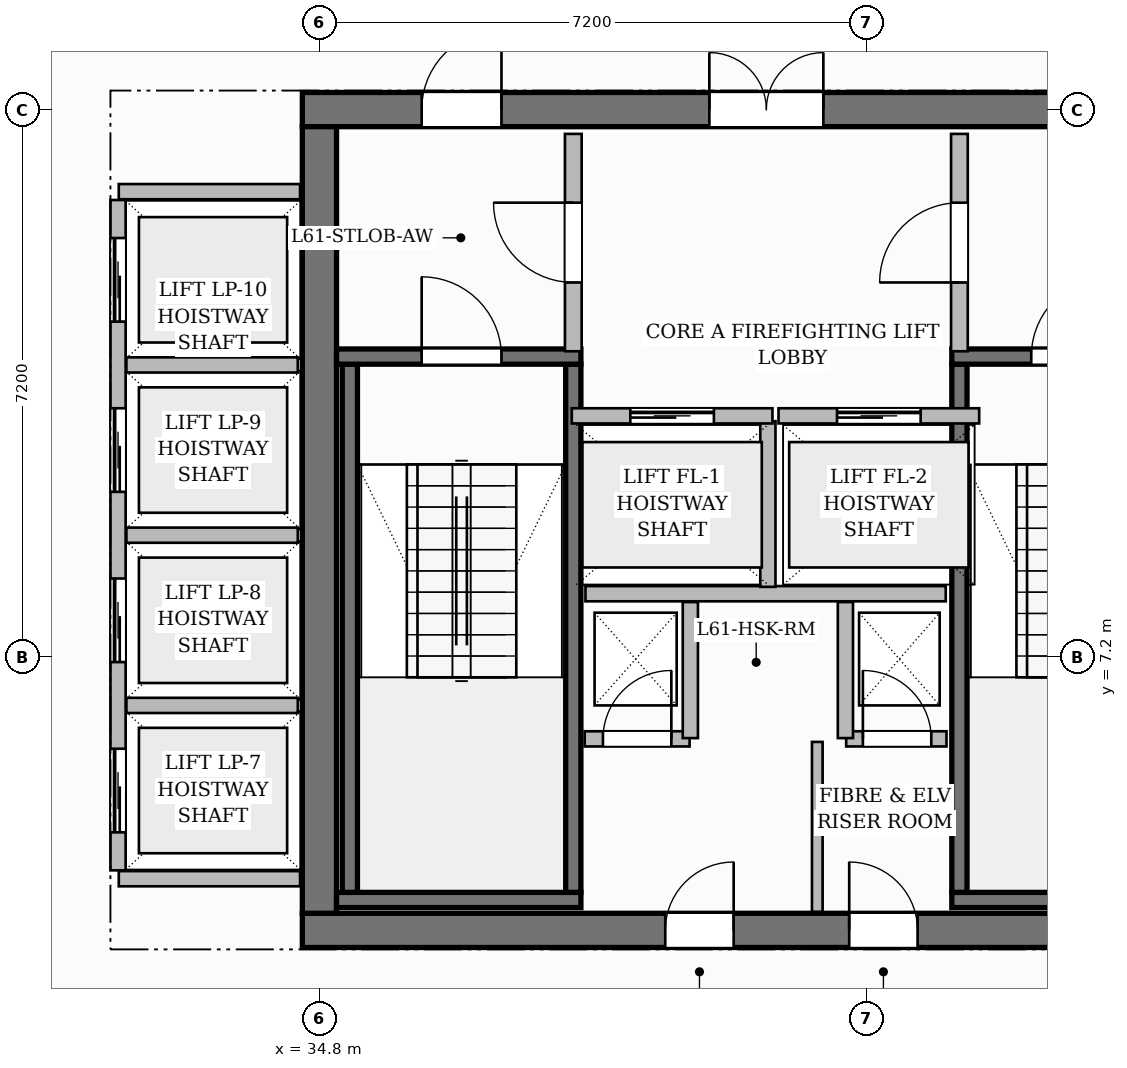
"""IFC4 building model, lengths in metres.
Left out: names, types, materials, properties, quantities, classifications, styles, units other than length and angle.
Written with IfcOpenShell. Run it as: python <this file> out.ifc"""

import sys

from ifc_helpers import new_model, si_unit, direction, frame, frame_2d, origin, place, context, subcontext, project, spatial, rectangle, extrude, source, transform, mapped, element, fill, save


model = new_model("IFC4")
c1 = context("Model", 3, precision=1e-05, world=origin(), true_north=direction((0.0, 1.0)))
c2 = subcontext(c1, "Body", "Model", "MODEL_VIEW")
j1 = project(units=[si_unit("LENGTHUNIT", "METRE"), si_unit("PLANEANGLEUNIT", "RADIAN")], contexts=[c1])
p1 = place(None, origin())
s1 = spatial("IfcSite", under=j1, at=p1, CompositionType="ELEMENT")
p2 = place(p1, origin())
s2 = spatial("IfcBuilding", under=s1, at=p2, CompositionType="ELEMENT")
p3 = place(p2, frame((0.0, 0.0, 244.25)))
s3 = spatial("IfcBuildingStorey", under=s2, at=p3, CompositionType="ELEMENT", Elevation=244.25)
p4 = place(p3, frame((34.575, 3.6, 0.0), z_axis=(0.0, 0.0, 1.0), x_axis=(1.0, 0.0, 0.0)))
e1 = element("IfcWall", 1, at=p4, inside=s3, PredefinedType="SHEAR", context=c2, shape_type="SweptSolid", body=[
    extrude(rectangle(XDim=15.45, YDim=0.45, at=frame_2d((7.725, 0.0))), origin(), (0.0, 0.0, 1.0), 3.85),
])
p5 = place(p4, frame((4.775, 0.0, 0.0)))
e2 = element("IfcOpeningElement", 2, at=p5, cuts=e1, PredefinedType="OPENING", context=c2, shape_type="SweptSolid", body=[
    extrude(rectangle(XDim=0.9, YDim=2.1, at=frame_2d((0.45, 1.05))), frame((0.0, 0.235, 0.0), z_axis=(0.0, -1.0, 0.0), x_axis=(1.0, 0.0, 0.0)), (0.0, 0.0, 1.0), 0.47),
])
p6 = place(p4, frame((7.195, 0.0, 0.0)))
e3 = element("IfcOpeningElement", 3, at=p6, cuts=e1, PredefinedType="OPENING", context=c2, shape_type="SweptSolid", body=[
    extrude(rectangle(XDim=0.9, YDim=2.1, at=frame_2d((0.45, 1.05))), frame((0.0, 0.235, 0.0), z_axis=(0.0, -1.0, 0.0), x_axis=(1.0, 0.0, 0.0)), (0.0, 0.0, 1.0), 0.47),
])
p7 = place(p3, frame((34.575, 14.4, 0.0), z_axis=(0.0, 0.0, 1.0), x_axis=(1.0, 0.0, 0.0)))
e4 = element("IfcWall", 4, at=p7, inside=s3, PredefinedType="SHEAR", context=c2, shape_type="SweptSolid", body=[
    extrude(rectangle(XDim=15.45, YDim=0.45, at=frame_2d((7.725, 0.0))), origin(), (0.0, 0.0, 1.0), 3.85),
])
p8 = place(p7, frame((5.355, 0.0, 0.0)))
e5 = element("IfcOpeningElement", 5, at=p8, cuts=e4, PredefinedType="OPENING", context=c2, shape_type="SweptSolid", body=[
    extrude(rectangle(XDim=1.5, YDim=2.2, at=frame_2d((0.75, 1.1))), frame((0.0, 0.235, 0.0), z_axis=(0.0, -1.0, 0.0), x_axis=(1.0, 0.0, 0.0)), (0.0, 0.0, 1.0), 0.47),
])
p9 = place(p7, frame((1.57, 0.0, 0.0)))
e6 = element("IfcOpeningElement", 6, at=p9, cuts=e4, PredefinedType="OPENING", context=c2, shape_type="SweptSolid", body=[
    extrude(rectangle(XDim=1.05, YDim=2.15, at=frame_2d((0.525, 1.075))), frame((0.0, 0.235, 0.0), z_axis=(0.0, -1.0, 0.0), x_axis=(1.0, 0.0, 0.0)), (0.0, 0.0, 1.0), 0.47),
])
p10 = place(p7, frame((11.2, 0.0, 0.0)))
e7 = element("IfcOpeningElement", 7, at=p10, cuts=e4, PredefinedType="OPENING", context=c2, shape_type="SweptSolid", body=[
    extrude(rectangle(XDim=1.05, YDim=2.15, at=frame_2d((0.525, 1.075))), frame((0.0, 0.235, 0.0), z_axis=(0.0, -1.0, 0.0), x_axis=(1.0, 0.0, 0.0)), (0.0, 0.0, 1.0), 0.47),
])
p11 = place(p3, frame((34.8, 3.825, 0.0), z_axis=(0.0, 0.0, 1.0), x_axis=(0.0, 1.0, 0.0)))
e8 = element("IfcWall", 8, at=p11, inside=s3, PredefinedType="SHEAR", context=c2, shape_type="SweptSolid", body=[
    extrude(rectangle(XDim=10.35, YDim=0.45, at=frame_2d((5.175, 0.0))), origin(), (0.0, 0.0, 1.0), 3.85),
])
p12 = place(p3, frame((35.025, 4.0, 0.0), z_axis=(0.0, 0.0, 1.0), x_axis=(1.0, 0.0, 0.0)))
e9 = element("IfcWall", 9, at=p12, inside=s3, PredefinedType="SHEAR", context=c2, shape_type="SweptSolid", body=[
    extrude(rectangle(XDim=3.215, YDim=0.2, at=frame_2d((1.607, 0.0))), origin(), (0.0, 0.0, 1.0), 3.85),
])
for number, where, z_axis, x_axis in (
    (10, (35.2, 4.1, 0.0), (0.0, 0.0, 1.0), (0.0, 1.0, 0.0)),
    (11, (38.14, 4.1, 0.0), (0.0, 0.0, 1.0), (0.0, 1.0, 0.0)),
):
    element("IfcWall", number, at=place(p3, frame(where, z_axis=z_axis, x_axis=x_axis)), inside=s3, PredefinedType="SHEAR", context=c2, shape_type="SweptSolid", body=[
        extrude(rectangle(XDim=6.95, YDim=0.2, at=frame_2d((3.475, 0.0))), origin(), (0.0, 0.0, 1.0), 3.85),
    ])
p13 = place(p3, frame((35.025, 11.15, 0.0), z_axis=(0.0, 0.0, 1.0), x_axis=(1.0, 0.0, 0.0)))
e12 = element("IfcWall", 12, at=p13, inside=s3, PredefinedType="SHEAR", context=c2, shape_type="SweptSolid", body=[
    extrude(rectangle(XDim=3.215, YDim=0.2, at=frame_2d((1.607, 0.0))), origin(), (0.0, 0.0, 1.0), 3.85),
])
p14 = place(p13, frame((1.12, 0.0, 0.0)))
e13 = element("IfcOpeningElement", 13, at=p14, cuts=e12, PredefinedType="OPENING", context=c2, shape_type="SweptSolid", body=[
    extrude(rectangle(XDim=1.05, YDim=2.2, at=frame_2d((0.525, 1.1))), frame((0.0, 0.11, 0.0), z_axis=(0.0, -1.0, 0.0), x_axis=(1.0, 0.0, 0.0)), (0.0, 0.0, 1.0), 0.22),
])
p15 = place(p3, frame((43.12, 4.0, 0.0), z_axis=(0.0, 0.0, 1.0), x_axis=(1.0, 0.0, 0.0)))
e14 = element("IfcWall", 14, at=p15, inside=s3, PredefinedType="SHEAR", context=c2, shape_type="SweptSolid", body=[
    extrude(rectangle(XDim=6.455, YDim=0.2, at=frame_2d((3.228, 0.0))), origin(), (0.0, 0.0, 1.0), 3.85),
])
p16 = place(p3, frame((43.22, 4.1, 0.0), z_axis=(0.0, 0.0, 1.0), x_axis=(0.0, 1.0, 0.0)))
e15 = element("IfcWall", 15, at=p16, inside=s3, PredefinedType="SHEAR", context=c2, shape_type="SweptSolid", body=[
    extrude(rectangle(XDim=6.95, YDim=0.2, at=frame_2d((3.475, 0.0))), origin(), (0.0, 0.0, 1.0), 3.85),
])
p17 = place(p3, frame((43.12, 11.15, 0.0), z_axis=(0.0, 0.0, 1.0), x_axis=(1.0, 0.0, 0.0)))
e16 = element("IfcWall", 16, at=p17, inside=s3, PredefinedType="SHEAR", context=c2, shape_type="SweptSolid", body=[
    extrude(rectangle(XDim=6.455, YDim=0.2, at=frame_2d((3.228, 0.0))), origin(), (0.0, 0.0, 1.0), 3.85),
])
p18 = place(p17, frame((1.045, 0.0, 0.0)))
e17 = element("IfcOpeningElement", 17, at=p18, cuts=e16, PredefinedType="OPENING", context=c2, shape_type="SweptSolid", body=[
    extrude(rectangle(XDim=1.05, YDim=2.2, at=frame_2d((0.525, 1.1))), frame((0.0, 0.11, 0.0), z_axis=(0.0, -1.0, 0.0), x_axis=(1.0, 0.0, 0.0)), (0.0, 0.0, 1.0), 0.22),
])
p19 = place(p17, frame((4.125, 0.0, 0.0)))
e18 = element("IfcOpeningElement", 18, at=p19, cuts=e16, PredefinedType="OPENING", context=c2, shape_type="SweptSolid", body=[
    extrude(rectangle(XDim=1.05, YDim=2.2, at=frame_2d((0.525, 1.1))), frame((0.0, 0.11, 0.0), z_axis=(0.0, -1.0, 0.0), x_axis=(1.0, 0.0, 0.0)), (0.0, 0.0, 1.0), 0.22),
])
p20 = place(p3, frame((38.3, 8.03, 0.0), z_axis=(0.0, 0.0, 1.0), x_axis=(1.0, 0.0, 0.0)))
e19 = element("IfcWall", 19, at=p20, inside=s3, PredefinedType="PARTITIONING", context=c2, shape_type="SweptSolid", body=[
    extrude(rectangle(XDim=4.74, YDim=0.2, at=frame_2d((2.37, 0.0))), origin(), (0.0, 0.0, 1.0), 3.6),
])
p21 = place(p3, frame((40.7, 8.12, 0.0), z_axis=(0.0, 0.0, 1.0), x_axis=(0.0, 1.0, 0.0)))
e20 = element("IfcWall", 20, at=p21, inside=s3, PredefinedType="PARTITIONING", context=c2, shape_type="SweptSolid", body=[
    extrude(rectangle(XDim=2.18, YDim=0.2, at=frame_2d((1.09, 0.0))), origin(), (0.0, 0.0, 1.0), 3.6),
])
p22 = place(p3, frame((38.14, 11.22, 0.0), z_axis=(0.0, 0.0, 1.0), x_axis=(0.0, 1.0, 0.0)))
e21 = element("IfcWall", 21, at=p22, inside=s3, PredefinedType="PARTITIONING", context=c2, shape_type="SweptSolid", body=[
    extrude(rectangle(XDim=2.86, YDim=0.22, at=frame_2d((1.43, 0.0))), origin(), (0.0, 0.0, 1.0), 3.6),
])
p23 = place(p22, frame((0.905, 0.0, 0.0)))
e22 = element("IfcOpeningElement", 22, at=p23, cuts=e21, PredefinedType="OPENING", context=c2, shape_type="SweptSolid", body=[
    extrude(rectangle(XDim=1.05, YDim=2.15, at=frame_2d((0.525, 1.075))), frame((0.0, 0.12, 0.0), z_axis=(0.0, -1.0, 0.0), x_axis=(1.0, 0.0, 0.0)), (0.0, 0.0, 1.0), 0.24),
])
p24 = place(p3, frame((43.22, 11.22, 0.0), z_axis=(0.0, 0.0, 1.0), x_axis=(0.0, 1.0, 0.0)))
e23 = element("IfcWall", 23, at=p24, inside=s3, PredefinedType="PARTITIONING", context=c2, shape_type="SweptSolid", body=[
    extrude(rectangle(XDim=2.86, YDim=0.22, at=frame_2d((1.43, 0.0))), origin(), (0.0, 0.0, 1.0), 3.6),
])
p25 = place(p24, frame((0.905, 0.0, 0.0)))
e24 = element("IfcOpeningElement", 24, at=p25, cuts=e23, PredefinedType="OPENING", context=c2, shape_type="SweptSolid", body=[
    extrude(rectangle(XDim=1.05, YDim=2.15, at=frame_2d((0.525, 1.075))), frame((0.0, 0.12, 0.0), z_axis=(0.0, -1.0, 0.0), x_axis=(1.0, 0.0, 0.0)), (0.0, 0.0, 1.0), 0.24),
])
p26 = place(p3, frame((38.29, 6.12, 0.0), z_axis=(0.0, 0.0, 1.0), x_axis=(1.0, 0.0, 0.0)))
e25 = element("IfcWall", 25, at=p26, inside=s3, PredefinedType="PARTITIONING", context=c2, shape_type="SweptSolid", body=[
    extrude(rectangle(XDim=1.38, YDim=0.2, at=frame_2d((0.69, 0.0))), origin(), (0.0, 0.0, 1.0), 3.6),
])
p27 = place(p26, frame((0.24, 0.0, 0.0)))
e26 = element("IfcOpeningElement", 26, at=p27, cuts=e25, PredefinedType="OPENING", context=c2, shape_type="SweptSolid", body=[
    extrude(rectangle(XDim=0.9, YDim=2.1, at=frame_2d((0.45, 1.05))), frame((0.0, 0.11, 0.0), z_axis=(0.0, -1.0, 0.0), x_axis=(1.0, 0.0, 0.0)), (0.0, 0.0, 1.0), 0.22),
])
p28 = place(p3, frame((39.68, 6.13, 0.0), z_axis=(0.0, 0.0, 1.0), x_axis=(0.0, 1.0, 0.0)))
e27 = element("IfcWall", 27, at=p28, inside=s3, PredefinedType="PARTITIONING", context=c2, shape_type="SweptSolid", body=[
    extrude(rectangle(XDim=1.79, YDim=0.2, at=frame_2d((0.895, 0.0))), origin(), (0.0, 0.0, 1.0), 3.6),
])
p29 = place(p3, frame((41.73, 6.12, 0.0), z_axis=(0.0, 0.0, 1.0), x_axis=(1.0, 0.0, 0.0)))
e28 = element("IfcWall", 28, at=p29, inside=s3, PredefinedType="PARTITIONING", context=c2, shape_type="SweptSolid", body=[
    extrude(rectangle(XDim=1.32, YDim=0.2, at=frame_2d((0.66, 0.0))), origin(), (0.0, 0.0, 1.0), 3.6),
])
p30 = place(p29, frame((0.22, 0.0, 0.0)))
e29 = element("IfcOpeningElement", 29, at=p30, cuts=e28, PredefinedType="OPENING", context=c2, shape_type="SweptSolid", body=[
    extrude(rectangle(XDim=0.9, YDim=2.1, at=frame_2d((0.45, 1.05))), frame((0.0, 0.11, 0.0), z_axis=(0.0, -1.0, 0.0), x_axis=(1.0, 0.0, 0.0)), (0.0, 0.0, 1.0), 0.22),
])
p31 = place(p3, frame((41.72, 6.13, 0.0), z_axis=(0.0, 0.0, 1.0), x_axis=(0.0, 1.0, 0.0)))
e30 = element("IfcWall", 30, at=p31, inside=s3, PredefinedType="PARTITIONING", context=c2, shape_type="SweptSolid", body=[
    extrude(rectangle(XDim=1.79, YDim=0.2, at=frame_2d((0.895, 0.0))), origin(), (0.0, 0.0, 1.0), 3.6),
])
p32 = place(p3, frame((41.35, 3.845, 0.0), z_axis=(0.0, 0.0, 1.0), x_axis=(0.0, 1.0, 0.0)))
e31 = element("IfcWall", 31, at=p32, inside=s3, PredefinedType="PARTITIONING", context=c2, shape_type="SweptSolid", body=[
    extrude(rectangle(XDim=2.235, YDim=0.14, at=frame_2d((1.118, 0.0))), origin(), (0.0, 0.0, 1.0), 3.6),
])
for number, where, z_axis, x_axis in (
    (32, (32.16, 4.28, 0.0), (0.0, 0.0, 1.0), (1.0, 0.0, 0.0)),
    (33, (32.16, 13.32, 0.0), (0.0, 0.0, 1.0), (1.0, 0.0, 0.0)),
):
    element("IfcWall", number, at=place(p3, frame(where, z_axis=z_axis, x_axis=x_axis)), inside=s3, PredefinedType="PARTITIONING", context=c2, shape_type="SweptSolid", body=[
        extrude(rectangle(XDim=2.385, YDim=0.2, at=frame_2d((1.192, 0.0))), origin(), (0.0, 0.0, 1.0), 3.6),
    ])
p33 = place(p3, frame((32.15, 4.39, 0.0), z_axis=(0.0, 0.0, 1.0), x_axis=(0.0, 1.0, 0.0)))
e34 = element("IfcWall", 34, at=p33, inside=s3, PredefinedType="PARTITIONING", context=c2, shape_type="SweptSolid", body=[
    extrude(rectangle(XDim=8.82, YDim=0.2, at=frame_2d((4.41, 0.0))), origin(), (0.0, 0.0, 1.0), 3.6),
])
p34 = place(p33, frame((0.5, 0.0, 0.0)))
e35 = element("IfcOpeningElement", 35, at=p34, cuts=e34, PredefinedType="OPENING", context=c2, shape_type="SweptSolid", body=[
    extrude(rectangle(XDim=1.1, YDim=2.2, at=frame_2d((0.55, 1.1))), frame((0.0, 0.11, 0.0), z_axis=(0.0, -1.0, 0.0), x_axis=(1.0, 0.0, 0.0)), (0.0, 0.0, 1.0), 0.22),
])
p35 = place(p33, frame((2.74, 0.0, 0.0)))
e36 = element("IfcOpeningElement", 36, at=p35, cuts=e34, PredefinedType="OPENING", context=c2, shape_type="SweptSolid", body=[
    extrude(rectangle(XDim=1.1, YDim=2.2, at=frame_2d((0.55, 1.1))), frame((0.0, 0.11, 0.0), z_axis=(0.0, -1.0, 0.0), x_axis=(1.0, 0.0, 0.0)), (0.0, 0.0, 1.0), 0.22),
])
p36 = place(p33, frame((4.98, 0.0, 0.0)))
e37 = element("IfcOpeningElement", 37, at=p36, cuts=e34, PredefinedType="OPENING", context=c2, shape_type="SweptSolid", body=[
    extrude(rectangle(XDim=1.1, YDim=2.2, at=frame_2d((0.55, 1.1))), frame((0.0, 0.11, 0.0), z_axis=(0.0, -1.0, 0.0), x_axis=(1.0, 0.0, 0.0)), (0.0, 0.0, 1.0), 0.22),
])
p37 = place(p33, frame((7.22, 0.0, 0.0)))
e38 = element("IfcOpeningElement", 38, at=p37, cuts=e34, PredefinedType="OPENING", context=c2, shape_type="SweptSolid", body=[
    extrude(rectangle(XDim=1.1, YDim=2.2, at=frame_2d((0.55, 1.1))), frame((0.0, 0.11, 0.0), z_axis=(0.0, -1.0, 0.0), x_axis=(1.0, 0.0, 0.0)), (0.0, 0.0, 1.0), 0.22),
])
for number, where, z_axis, x_axis in (
    (39, (32.26, 6.56, 0.0), (0.0, 0.0, 1.0), (1.0, 0.0, 0.0)),
    (40, (32.26, 8.8, 0.0), (0.0, 0.0, 1.0), (1.0, 0.0, 0.0)),
    (41, (32.26, 11.04, 0.0), (0.0, 0.0, 1.0), (1.0, 0.0, 0.0)),
):
    element("IfcWall", number, at=place(p3, frame(where, z_axis=z_axis, x_axis=x_axis)), inside=s3, PredefinedType="PARTITIONING", context=c2, shape_type="SweptSolid", body=[
        extrude(rectangle(XDim=2.255, YDim=0.2, at=frame_2d((1.127, 0.0))), origin(), (0.0, 0.0, 1.0), 3.6),
    ])
p38 = place(p3, frame((38.12, 10.37, 0.0), z_axis=(0.0, 0.0, 1.0), x_axis=(1.0, 0.0, 0.0)))
e42 = element("IfcWall", 42, at=p38, inside=s3, PredefinedType="PARTITIONING", context=c2, shape_type="SweptSolid", body=[
    extrude(rectangle(XDim=2.64, YDim=0.2, at=frame_2d((1.32, 0.0))), origin(), (0.0, 0.0, 1.0), 3.6),
])
p39 = place(p38, frame((0.77, 0.0, 0.0)))
e43 = element("IfcOpeningElement", 43, at=p39, cuts=e42, PredefinedType="OPENING", context=c2, shape_type="SweptSolid", body=[
    extrude(rectangle(XDim=1.1, YDim=2.2, at=frame_2d((0.55, 1.1))), frame((0.0, 0.11, 0.0), z_axis=(0.0, -1.0, 0.0), x_axis=(1.0, 0.0, 0.0)), (0.0, 0.0, 1.0), 0.22),
])
p40 = place(p3, frame((40.84, 10.37, 0.0), z_axis=(0.0, 0.0, 1.0), x_axis=(1.0, 0.0, 0.0)))
e44 = element("IfcWall", 44, at=p40, inside=s3, PredefinedType="PARTITIONING", context=c2, shape_type="SweptSolid", body=[
    extrude(rectangle(XDim=2.64, YDim=0.2, at=frame_2d((1.32, 0.0))), origin(), (0.0, 0.0, 1.0), 3.6),
])
p41 = place(p40, frame((0.77, 0.0, 0.0)))
e45 = element("IfcOpeningElement", 45, at=p41, cuts=e44, PredefinedType="OPENING", context=c2, shape_type="SweptSolid", body=[
    extrude(rectangle(XDim=1.1, YDim=2.2, at=frame_2d((0.55, 1.1))), frame((0.0, 0.11, 0.0), z_axis=(0.0, -1.0, 0.0), x_axis=(1.0, 0.0, 0.0)), (0.0, 0.0, 1.0), 0.22),
])
m1 = source(origin(), c2, "Body", "SweptSolid", [
    extrude(rectangle(XDim=1.05, YDim=2.2, at=frame_2d((0.525, 1.1))), frame((0.0, 0.025, 0.0), z_axis=(0.0, -1.0, 0.0), x_axis=(1.0, 0.0, 0.0)), (0.0, 0.0, 1.0), 0.05),
])
p42 = place(p14, origin())
e46 = element("IfcDoor", 46, at=p42, inside=s3, OperationType="SINGLE_SWING_LEFT", PredefinedType="DOOR", context=c2, shape_type="MappedRepresentation", body=[
    mapped(m1, transform((0.0, 0.0, 0.0), scale=1.0)),
])
fill(e13, e46)
p43 = place(p18, origin())
e47 = element("IfcDoor", 47, at=p43, inside=s3, OperationType="SINGLE_SWING_RIGHT", PredefinedType="DOOR", context=c2, shape_type="MappedRepresentation", body=[
    mapped(m1, transform((0.0, 0.0, 0.0), scale=1.0)),
])
fill(e17, e47)
m2 = source(origin(), c2, "Body", "SweptSolid", [
    extrude(rectangle(XDim=1.05, YDim=2.15, at=frame_2d((0.525, 1.075))), frame((0.0, 0.025, 0.0), z_axis=(0.0, -1.0, 0.0), x_axis=(1.0, 0.0, 0.0)), (0.0, 0.0, 1.0), 0.05),
])
p44 = place(p23, origin())
e48 = element("IfcDoor", 48, at=p44, inside=s3, OperationType="SINGLE_SWING_RIGHT", PredefinedType="DOOR", context=c2, shape_type="MappedRepresentation", body=[
    mapped(m2, transform((0.0, 0.0, 0.0), scale=1.0)),
])
fill(e22, e48)
p45 = place(p25, origin())
e49 = element("IfcDoor", 49, at=p45, inside=s3, OperationType="SINGLE_SWING_LEFT", PredefinedType="DOOR", context=c2, shape_type="MappedRepresentation", body=[
    mapped(m2, transform((0.0, 0.0, 0.0), scale=1.0)),
])
fill(e24, e49)
m3 = source(origin(), c2, "Body", "SweptSolid", [
    extrude(rectangle(XDim=1.5, YDim=2.2, at=frame_2d((0.75, 1.1))), frame((0.0, 0.025, 0.0), z_axis=(0.0, -1.0, 0.0), x_axis=(1.0, 0.0, 0.0)), (0.0, 0.0, 1.0), 0.05),
])
p46 = place(p8, origin())
e50 = element("IfcDoor", 50, at=p46, inside=s3, OperationType="DOUBLE_DOOR_SINGLE_SWING", PredefinedType="DOOR", context=c2, shape_type="MappedRepresentation", body=[
    mapped(m3, transform((0.0, 0.0, 0.0), scale=1.0)),
])
fill(e5, e50)
p47 = place(p9, origin())
e51 = element("IfcDoor", 51, at=p47, inside=s3, OperationType="SINGLE_SWING_RIGHT", PredefinedType="DOOR", context=c2, shape_type="MappedRepresentation", body=[
    mapped(m2, transform((0.0, 0.0, 0.0), scale=1.0)),
])
fill(e6, e51)
m4 = source(origin(), c2, "Body", "SweptSolid", [
    extrude(rectangle(XDim=0.9, YDim=2.1, at=frame_2d((0.45, 1.05))), frame((0.0, 0.025, 0.0), z_axis=(0.0, -1.0, 0.0), x_axis=(1.0, 0.0, 0.0)), (0.0, 0.0, 1.0), 0.05),
])
p48 = place(p27, origin())
e52 = element("IfcDoor", 52, at=p48, inside=s3, OperationType="SINGLE_SWING_RIGHT", PredefinedType="DOOR", context=c2, shape_type="MappedRepresentation", body=[
    mapped(m4, transform((0.0, 0.0, 0.0), scale=1.0)),
])
fill(e26, e52)
p49 = place(p30, origin())
e53 = element("IfcDoor", 53, at=p49, inside=s3, OperationType="SINGLE_SWING_LEFT", PredefinedType="DOOR", context=c2, shape_type="MappedRepresentation", body=[
    mapped(m4, transform((0.0, 0.0, 0.0), scale=1.0)),
])
fill(e29, e53)
p50 = place(p5, origin())
e54 = element("IfcDoor", 54, at=p50, inside=s3, OperationType="SINGLE_SWING_RIGHT", PredefinedType="DOOR", context=c2, shape_type="MappedRepresentation", body=[
    mapped(m4, transform((0.0, 0.0, 0.0), scale=1.0)),
])
fill(e2, e54)
p51 = place(p6, origin())
e55 = element("IfcDoor", 55, at=p51, inside=s3, OperationType="SINGLE_SWING_LEFT", PredefinedType="DOOR", context=c2, shape_type="MappedRepresentation", body=[
    mapped(m4, transform((0.0, 0.0, 0.0), scale=1.0)),
])
fill(e3, e55)
m5 = source(origin(), c2, "Body", "SweptSolid", [
    extrude(rectangle(XDim=1.1, YDim=2.2, at=frame_2d((0.55, 1.1))), frame((0.0, 0.025, 0.0), z_axis=(0.0, -1.0, 0.0), x_axis=(1.0, 0.0, 0.0)), (0.0, 0.0, 1.0), 0.05),
])
p52 = place(p39, origin())
e56 = element("IfcDoor", 56, at=p52, inside=s3, OperationType="SLIDING_TO_LEFT", PredefinedType="DOOR", context=c2, shape_type="MappedRepresentation", body=[
    mapped(m5, transform((0.0, 0.0, 0.0), scale=1.0)),
])
fill(e43, e56)
p53 = place(p41, origin())
e57 = element("IfcDoor", 57, at=p53, inside=s3, OperationType="SLIDING_TO_LEFT", PredefinedType="DOOR", context=c2, shape_type="MappedRepresentation", body=[
    mapped(m5, transform((0.0, 0.0, 0.0), scale=1.0)),
])
fill(e45, e57)
p54 = place(p34, origin())
e58 = element("IfcDoor", 58, at=p54, inside=s3, OperationType="SLIDING_TO_LEFT", PredefinedType="DOOR", context=c2, shape_type="MappedRepresentation", body=[
    mapped(m5, transform((0.0, 0.0, 0.0), scale=1.0)),
])
fill(e35, e58)
p55 = place(p35, origin())
e59 = element("IfcDoor", 59, at=p55, inside=s3, OperationType="SLIDING_TO_LEFT", PredefinedType="DOOR", context=c2, shape_type="MappedRepresentation", body=[
    mapped(m5, transform((0.0, 0.0, 0.0), scale=1.0)),
])
fill(e36, e59)
p56 = place(p36, origin())
e60 = element("IfcDoor", 60, at=p56, inside=s3, OperationType="SLIDING_TO_LEFT", PredefinedType="DOOR", context=c2, shape_type="MappedRepresentation", body=[
    mapped(m5, transform((0.0, 0.0, 0.0), scale=1.0)),
])
fill(e37, e60)
p57 = place(p37, origin())
e61 = element("IfcDoor", 61, at=p57, inside=s3, OperationType="SLIDING_TO_LEFT", PredefinedType="DOOR", context=c2, shape_type="MappedRepresentation", body=[
    mapped(m5, transform((0.0, 0.0, 0.0), scale=1.0)),
])
fill(e38, e61)
save(model, sys.argv[1])
